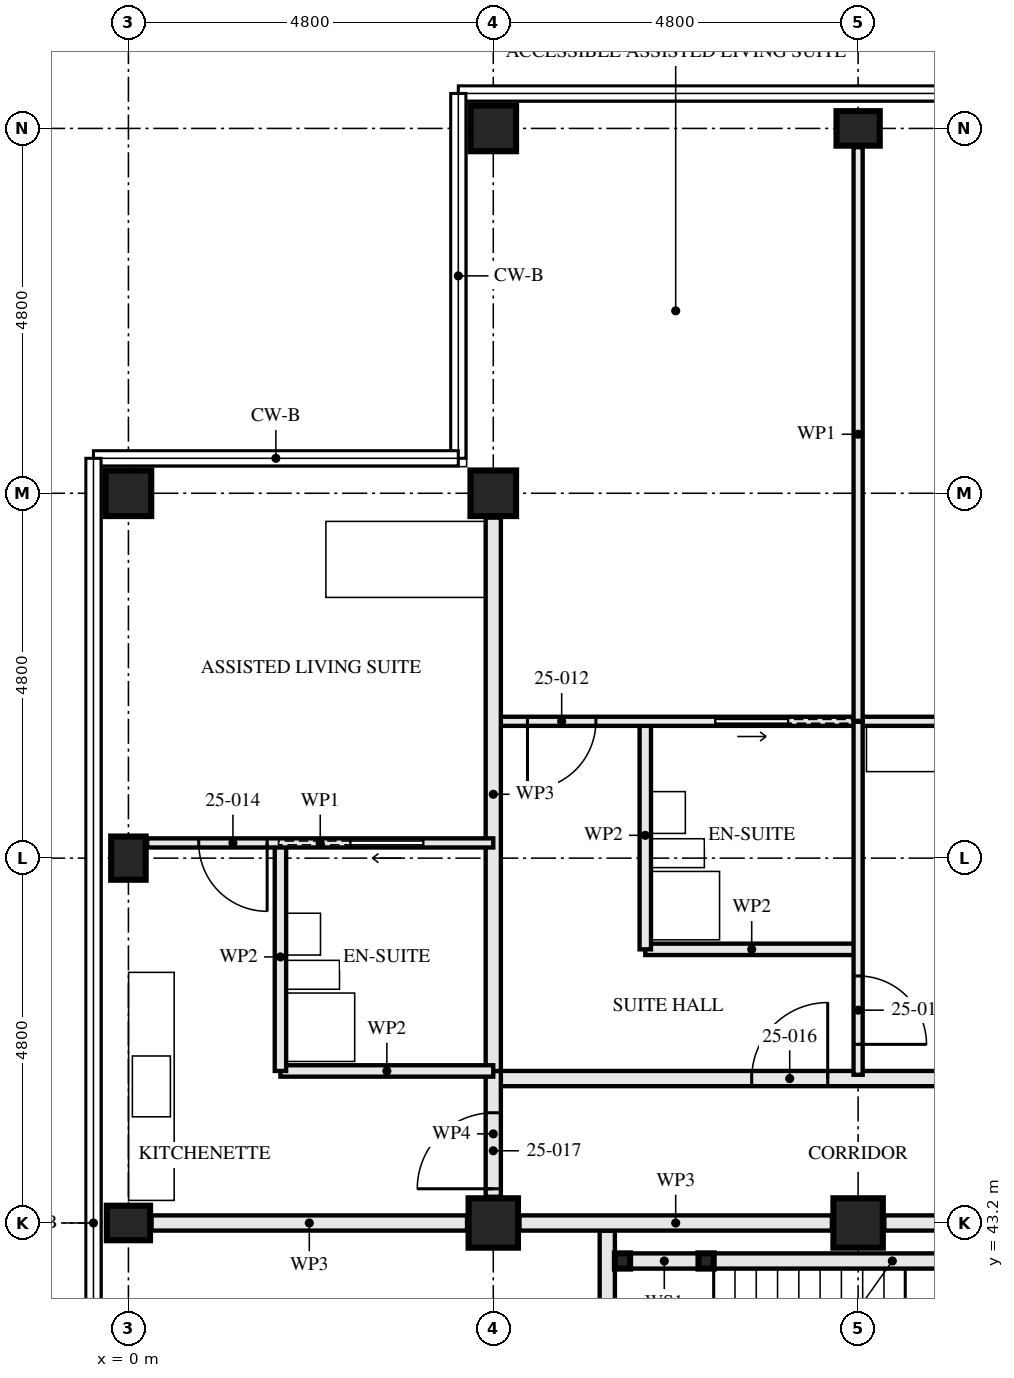
"""IFC4 building model, lengths in metres.
Left out: names, types, materials, properties, quantities, classifications, styles, units other than length and angle.
Written with IfcOpenShell. Run it as: python <this file> out.ifc"""

import sys

from ifc_helpers import new_model, si_unit, direction, frame, frame_2d, origin, origin_2d, place, context, subcontext, project, spatial, rectangle, hollow_rectangle, i_section, extrude, element, fill, save


model = new_model("IFC4")
c1 = context("Model", 3, precision=1e-05, world=origin(), true_north=direction((0.0, 1.0)))
c2 = subcontext(c1, "Body", "Model", "MODEL_VIEW")
j1 = project(units=[si_unit("LENGTHUNIT", "METRE"), si_unit("PLANEANGLEUNIT", "RADIAN")], contexts=[c1])
p1 = place(None, origin())
s1 = spatial("IfcSite", under=j1, at=p1, CompositionType="ELEMENT")
p2 = place(p1, origin())
s2 = spatial("IfcBuilding", under=s1, at=p2, CompositionType="ELEMENT")
p3 = place(p2, frame((0.0, 0.0, 94.5)))
s3 = spatial("IfcBuildingStorey", under=s2, at=p3, CompositionType="ELEMENT", Elevation=94.5)
for number, where, z_axis, x_axis in (
    (1, (0.0, 43.2, 0.0), (0.0, 0.0, 1.0), (0.0, 1.0, 0.0)),
    (2, (0.0, 48.0, 0.0), (0.0, 0.0, 1.0), (1.0, 0.0, 0.0)),
):
    element("IfcColumn", number, at=place(p3, frame(where, z_axis=z_axis, x_axis=x_axis)), inside=s3, PredefinedType="COLUMN", context=c2, shape_type="SweptSolid", body=[
        extrude(i_section(OverallWidth=0.454, OverallDepth=0.569, WebThickness=0.078, FlangeThickness=0.125, FilletRadius=0.015, at=origin_2d()), origin(), (0.0, 0.0, 1.0), 3.5),
    ])
p4 = place(p3, frame((0.0, 52.8, 0.0), z_axis=(0.0, 0.0, 1.0), x_axis=(0.0, 1.0, 0.0)))
e3 = element("IfcColumn", 3, at=p4, inside=s3, PredefinedType="COLUMN", context=c2, shape_type="SweptSolid", body=[
    extrude(hollow_rectangle(XDim=0.6, YDim=0.6, WallThickness=0.05, at=origin_2d()), origin(), (0.0, 0.0, 1.0), 3.5),
])
p5 = place(p3, frame((4.8, 43.2, 0.0), z_axis=(0.0, 0.0, 1.0), x_axis=(0.0, 1.0, 0.0)))
e4 = element("IfcColumn", 4, at=p5, inside=s3, PredefinedType="COLUMN", context=c2, shape_type="SweptSolid", body=[
    extrude(hollow_rectangle(XDim=0.65, YDim=0.65, WallThickness=0.05, at=origin_2d()), origin(), (0.0, 0.0, 1.0), 3.5),
])
for number, where, z_axis, x_axis in (
    (5, (4.8, 52.8, 0.0), (0.0, 0.0, 1.0), (0.0, 1.0, 0.0)),
    (6, (4.8, 57.6, 0.0), (0.0, 0.0, 1.0), (0.0, 1.0, 0.0)),
):
    element("IfcColumn", number, at=place(p3, frame(where, z_axis=z_axis, x_axis=x_axis)), inside=s3, PredefinedType="COLUMN", context=c2, shape_type="SweptSolid", body=[
        extrude(hollow_rectangle(XDim=0.6, YDim=0.6, WallThickness=0.05, at=origin_2d()), origin(), (0.0, 0.0, 1.0), 3.5),
    ])
p6 = place(p3, frame((9.6, 43.2, 0.0), z_axis=(0.0, 0.0, 1.0), x_axis=(0.0, 1.0, 0.0)))
e7 = element("IfcColumn", 7, at=p6, inside=s3, PredefinedType="COLUMN", context=c2, shape_type="SweptSolid", body=[
    extrude(hollow_rectangle(XDim=0.65, YDim=0.65, WallThickness=0.05, at=origin_2d()), origin(), (0.0, 0.0, 1.0), 3.5),
])
p7 = place(p3, frame((9.6, 57.6, 0.0), z_axis=(0.0, 0.0, 1.0), x_axis=(0.0, 1.0, 0.0)))
e8 = element("IfcColumn", 8, at=p7, inside=s3, PredefinedType="COLUMN", context=c2, shape_type="SweptSolid", body=[
    extrude(i_section(OverallWidth=0.454, OverallDepth=0.569, WebThickness=0.078, FlangeThickness=0.125, FilletRadius=0.015, at=origin_2d()), origin(), (0.0, 0.0, 1.0), 3.5),
])
for number, where, z_axis, x_axis in (
    (9, (6.5, 42.7, 0.0), (0.0, 0.0, 1.0), (1.0, 0.0, 0.0)),
    (10, (7.6, 42.7, 0.0), (0.0, 0.0, 1.0), (1.0, 0.0, 0.0)),
):
    element("IfcColumn", number, at=place(p3, frame(where, z_axis=z_axis, x_axis=x_axis)), inside=s3, PredefinedType="COLUMN", context=c2, shape_type="SweptSolid", body=[
        extrude(hollow_rectangle(XDim=0.2, YDim=0.2, WallThickness=0.008, at=origin_2d()), origin(), (0.0, 0.0, 1.0), 3.33),
    ])
p8 = place(p3, frame((6.6, 42.7, 0.0), z_axis=(0.0, 0.0, 1.0), x_axis=(1.0, 0.0, 0.0)))
e11 = element("IfcWall", 11, at=p8, inside=s3, PredefinedType="SOLIDWALL", context=c2, shape_type="SweptSolid", body=[
    extrude(rectangle(XDim=0.9, YDim=0.2, at=frame_2d((0.45, 0.0))), origin(), (0.0, 0.0, 1.0), 2.99),
])
p9 = place(p3, frame((7.7, 42.7, 0.0), z_axis=(0.0, 0.0, 1.0), x_axis=(1.0, 0.0, 0.0)))
e12 = element("IfcWall", 12, at=p9, inside=s3, PredefinedType="SOLIDWALL", context=c2, shape_type="SweptSolid", body=[
    extrude(rectangle(XDim=4.7, YDim=0.2, at=frame_2d((2.35, 0.0))), origin(), (0.0, 0.0, 1.0), 2.99),
])
p10 = place(p3, frame((6.3, 43.1, 0.0), z_axis=(0.0, 0.0, 1.0), x_axis=(0.0, -1.0, 0.0)))
e13 = element("IfcWall", 13, at=p10, inside=s3, PredefinedType="SOLIDWALL", context=c2, shape_type="SweptSolid", body=[
    extrude(rectangle(XDim=3.3, YDim=0.2, at=frame_2d((1.65, 0.0))), origin(), (0.0, 0.0, 1.0), 3.33),
])
p11 = place(p3, frame((6.8, 49.8, 0.0), z_axis=(0.0, 0.0, 1.0), x_axis=(0.0, -1.0, 0.0)))
e14 = element("IfcWall", 14, at=p11, inside=s3, PredefinedType="PARTITIONING", context=c2, shape_type="SweptSolid", body=[
    extrude(rectangle(XDim=3.0, YDim=0.15, at=frame_2d((1.5, 0.0))), origin(), (0.0, 0.0, 1.0), 2.55),
])
p12 = place(p3, frame((9.6, 46.8, 0.0), z_axis=(0.0, 0.0, 1.0), x_axis=(-1.0, 0.0, 0.0)))
e15 = element("IfcWall", 15, at=p12, inside=s3, PredefinedType="PARTITIONING", context=c2, shape_type="SweptSolid", body=[
    extrude(rectangle(XDim=2.8, YDim=0.15, at=frame_2d((1.4, 0.0))), origin(), (0.0, 0.0, 1.0), 3.33),
])
p13 = place(p3, frame((9.6, 49.8, 0.0), z_axis=(0.0, 0.0, 1.0), x_axis=(0.0, -1.0, 0.0)))
e16 = element("IfcWall", 16, at=p13, inside=s3, PredefinedType="PARTITIONING", context=c2, shape_type="SweptSolid", body=[
    extrude(rectangle(XDim=4.65, YDim=0.12, at=frame_2d((2.325, 0.0))), origin(), (0.0, 0.0, 1.0), 2.55),
])
p14 = place(p13, frame((3.35, 0.0, 0.0)))
e17 = element("IfcOpeningElement", 17, at=p14, cuts=e16, PredefinedType="OPENING", context=c2, shape_type="SweptSolid", body=[
    extrude(rectangle(XDim=0.9, YDim=2.1, at=frame_2d((0.45, 1.05))), frame((0.0, 0.071, 0.0), z_axis=(0.0, -1.0, 0.0), x_axis=(1.0, 0.0, 0.0)), (0.0, 0.0, 1.0), 0.141),
])
p15 = place(p3, frame((14.4, 49.8, 0.0), z_axis=(0.0, 0.0, 1.0), x_axis=(-1.0, 0.0, 0.0)))
e18 = element("IfcWall", 18, at=p15, inside=s3, PredefinedType="PARTITIONING", context=c2, shape_type="SweptSolid", body=[
    extrude(rectangle(XDim=4.8, YDim=0.12, at=frame_2d((2.4, 0.0))), origin(), (0.0, 0.0, 1.0), 3.33),
])
p16 = place(p15, frame((0.45, 0.0, 0.0)))
e19 = element("IfcOpeningElement", 19, at=p16, cuts=e18, PredefinedType="OPENING", context=c2, shape_type="SweptSolid", body=[
    extrude(rectangle(XDim=0.9, YDim=2.1, at=frame_2d((0.45, 1.05))), frame((0.0, 0.071, 0.0), z_axis=(0.0, -1.0, 0.0), x_axis=(1.0, 0.0, 0.0)), (0.0, 0.0, 1.0), 0.141),
])
p17 = place(p3, frame((9.6, 49.8, 0.0), z_axis=(0.0, 0.0, 1.0), x_axis=(-1.0, 0.0, 0.0)))
e20 = element("IfcWall", 20, at=p17, inside=s3, PredefinedType="PARTITIONING", context=c2, shape_type="SweptSolid", body=[
    extrude(rectangle(XDim=4.8, YDim=0.12, at=frame_2d((2.4, 0.0))), origin(), (0.0, 0.0, 1.0), 3.33),
])
p18 = place(p17, frame((3.45, 0.0, 0.0)))
e21 = element("IfcOpeningElement", 21, at=p18, cuts=e20, PredefinedType="OPENING", context=c2, shape_type="SweptSolid", body=[
    extrude(rectangle(XDim=0.9, YDim=2.1, at=frame_2d((0.45, 1.05))), frame((0.0, 0.071, 0.0), z_axis=(0.0, -1.0, 0.0), x_axis=(1.0, 0.0, 0.0)), (0.0, 0.0, 1.0), 0.141),
])
p19 = place(p17, frame((0.925, 0.0, 0.0)))
e22 = element("IfcOpeningElement", 22, at=p19, cuts=e20, PredefinedType="OPENING", context=c2, shape_type="SweptSolid", body=[
    extrude(rectangle(XDim=0.95, YDim=2.1, at=frame_2d((0.475, 1.05))), frame((0.0, 0.071, 0.0), z_axis=(0.0, -1.0, 0.0), x_axis=(1.0, 0.0, 0.0)), (0.0, 0.0, 1.0), 0.141),
])
p20 = place(p3, frame((9.6, 57.353, 0.0), z_axis=(0.0, 0.0, 1.0), x_axis=(0.0, -1.0, 0.0)))
e23 = element("IfcWall", 23, at=p20, inside=s3, PredefinedType="PARTITIONING", context=c2, shape_type="SweptSolid", body=[
    extrude(rectangle(XDim=7.553, YDim=0.12, at=frame_2d((3.776, 0.0))), origin(), (0.0, 0.0, 1.0), 2.55),
])
p21 = place(p3, frame((4.8, 52.48, 0.0), z_axis=(0.0, 0.0, 1.0), x_axis=(0.0, -1.0, 0.0)))
e24 = element("IfcWall", 24, at=p21, inside=s3, PredefinedType="PARTITIONING", context=c2, shape_type="SweptSolid", body=[
    extrude(rectangle(XDim=7.28, YDim=0.2, at=frame_2d((3.64, 0.0))), origin(), (0.0, 0.0, 1.0), 2.55),
])
p22 = place(p3, frame((2.0, 48.2, 0.0), z_axis=(0.0, 0.0, 1.0), x_axis=(0.0, -1.0, 0.0)))
e25 = element("IfcWall", 25, at=p22, inside=s3, PredefinedType="PARTITIONING", context=c2, shape_type="SweptSolid", body=[
    extrude(rectangle(XDim=3.0, YDim=0.15, at=frame_2d((1.5, 0.0))), origin(), (0.0, 0.0, 1.0), 2.55),
])
p23 = place(p3, frame((4.8, 45.2, 0.0), z_axis=(0.0, 0.0, 1.0), x_axis=(-1.0, 0.0, 0.0)))
e26 = element("IfcWall", 26, at=p23, inside=s3, PredefinedType="PARTITIONING", context=c2, shape_type="SweptSolid", body=[
    extrude(rectangle(XDim=2.8, YDim=0.15, at=frame_2d((1.4, 0.0))), origin(), (0.0, 0.0, 1.0), 3.33),
])
p24 = place(p3, frame((4.8, 48.2, 0.0), z_axis=(0.0, 0.0, 1.0), x_axis=(-1.0, 0.0, 0.0)))
e27 = element("IfcWall", 27, at=p24, inside=s3, PredefinedType="PARTITIONING", context=c2, shape_type="SweptSolid", body=[
    extrude(rectangle(XDim=4.553, YDim=0.12, at=frame_2d((2.276, 0.0))), origin(), (0.0, 0.0, 1.0), 3.33),
])
p25 = place(p24, frame((2.975, 0.0, 0.0)))
e28 = element("IfcOpeningElement", 28, at=p25, cuts=e27, PredefinedType="OPENING", context=c2, shape_type="SweptSolid", body=[
    extrude(rectangle(XDim=0.9, YDim=2.1, at=frame_2d((0.45, 1.05))), frame((0.0, 0.071, 0.0), z_axis=(0.0, -1.0, 0.0), x_axis=(1.0, 0.0, 0.0)), (0.0, 0.0, 1.0), 0.141),
])
p26 = place(p24, frame((0.925, 0.0, 0.0)))
e29 = element("IfcOpeningElement", 29, at=p26, cuts=e27, PredefinedType="OPENING", context=c2, shape_type="SweptSolid", body=[
    extrude(rectangle(XDim=0.95, YDim=2.1, at=frame_2d((0.475, 1.05))), frame((0.0, 0.071, 0.0), z_axis=(0.0, -1.0, 0.0), x_axis=(1.0, 0.0, 0.0)), (0.0, 0.0, 1.0), 0.141),
])
p27 = place(p3, frame((14.4, 45.1, 0.0), z_axis=(0.0, 0.0, 1.0), x_axis=(-1.0, 0.0, 0.0)))
e30 = element("IfcWall", 30, at=p27, inside=s3, PredefinedType="PARTITIONING", context=c2, shape_type="SweptSolid", body=[
    extrude(rectangle(XDim=9.6, YDim=0.2, at=frame_2d((4.8, 0.0))), origin(), (0.0, 0.0, 1.0), 3.33),
])
p28 = place(p27, frame((5.2, 0.0, 0.0)))
e31 = element("IfcOpeningElement", 31, at=p28, cuts=e30, PredefinedType="OPENING", context=c2, shape_type="SweptSolid", body=[
    extrude(rectangle(XDim=1.0, YDim=2.1, at=frame_2d((0.5, 1.05))), frame((0.0, 0.111, 0.0), z_axis=(0.0, -1.0, 0.0), x_axis=(1.0, 0.0, 0.0)), (0.0, 0.0, 1.0), 0.221),
])
p29 = place(p3, frame((4.8, 45.2, 0.0), z_axis=(0.0, 0.0, 1.0), x_axis=(0.0, -1.0, 0.0)))
e32 = element("IfcWall", 32, at=p29, inside=s3, PredefinedType="PARTITIONING", context=c2, shape_type="SweptSolid", body=[
    extrude(rectangle(XDim=1.655, YDim=0.2, at=frame_2d((0.828, 0.0))), origin(), (0.0, 0.0, 1.0), 3.33),
])
p30 = place(p29, frame((0.55, 0.0, 0.0)))
e33 = element("IfcOpeningElement", 33, at=p30, cuts=e32, PredefinedType="OPENING", context=c2, shape_type="SweptSolid", body=[
    extrude(rectangle(XDim=1.0, YDim=2.1, at=frame_2d((0.5, 1.05))), frame((0.0, 0.111, 0.0), z_axis=(0.0, -1.0, 0.0), x_axis=(1.0, 0.0, 0.0)), (0.0, 0.0, 1.0), 0.221),
])
p31 = place(p3, frame((12.5, 43.2, 0.0), z_axis=(0.0, 0.0, 1.0), x_axis=(-1.0, 0.0, 0.0)))
e34 = element("IfcWall", 34, at=p31, inside=s3, PredefinedType="PARTITIONING", context=c2, shape_type="SweptSolid", body=[
    extrude(rectangle(XDim=2.555, YDim=0.2, at=frame_2d((1.277, 0.0))), origin(), (0.0, 0.0, 1.0), 2.32),
])
p32 = place(p3, frame((9.255, 43.2, 0.0), z_axis=(0.0, 0.0, 1.0), x_axis=(-1.0, 0.0, 0.0)))
e35 = element("IfcWall", 35, at=p32, inside=s3, PredefinedType="PARTITIONING", context=c2, shape_type="SweptSolid", body=[
    extrude(rectangle(XDim=4.11, YDim=0.2, at=frame_2d((2.055, 0.0))), origin(), (0.0, 0.0, 1.0), 2.32),
])
p33 = place(p3, frame((4.455, 43.2, 0.0), z_axis=(0.0, 0.0, 1.0), x_axis=(-1.0, 0.0, 0.0)))
e36 = element("IfcWall", 36, at=p33, inside=s3, PredefinedType="PARTITIONING", context=c2, shape_type="SweptSolid", body=[
    extrude(rectangle(XDim=4.151, YDim=0.2, at=frame_2d((2.075, 0.0))), origin(), (0.0, 0.0, 1.0), 2.32),
])
p34 = place(p14, origin())
e37 = element("IfcDoor", 37, at=p34, inside=s3, OperationType="SINGLE_SWING_LEFT", PredefinedType="DOOR", context=c2, shape_type="SweptSolid", body=[
    extrude(rectangle(XDim=0.9, YDim=2.1, at=frame_2d((0.45, 1.05))), frame((0.0, 0.022, 0.0), z_axis=(0.0, -1.0, 0.0), x_axis=(1.0, 0.0, 0.0)), (0.0, 0.0, 1.0), 0.044),
])
fill(e17, e37)
p35 = place(p18, origin())
e38 = element("IfcDoor", 38, at=p35, inside=s3, OperationType="SINGLE_SWING_LEFT", PredefinedType="DOOR", context=c2, shape_type="SweptSolid", body=[
    extrude(rectangle(XDim=0.9, YDim=2.1, at=frame_2d((0.45, 1.05))), frame((0.0, 0.022, 0.0), z_axis=(0.0, -1.0, 0.0), x_axis=(1.0, 0.0, 0.0)), (0.0, 0.0, 1.0), 0.044),
])
fill(e21, e38)
p36 = place(p19, origin())
e39 = element("IfcDoor", 39, at=p36, inside=s3, OperationType="SLIDING_TO_RIGHT", PredefinedType="DOOR", context=c2, shape_type="SweptSolid", body=[
    extrude(rectangle(XDim=0.95, YDim=2.1, at=frame_2d((0.475, 1.05))), frame((0.0, 0.022, 0.0), z_axis=(0.0, -1.0, 0.0), x_axis=(1.0, 0.0, 0.0)), (0.0, 0.0, 1.0), 0.044),
])
fill(e22, e39)
p37 = place(p25, origin())
e40 = element("IfcDoor", 40, at=p37, inside=s3, OperationType="SINGLE_SWING_RIGHT", PredefinedType="DOOR", context=c2, shape_type="SweptSolid", body=[
    extrude(rectangle(XDim=0.9, YDim=2.1, at=frame_2d((0.45, 1.05))), frame((0.0, 0.022, 0.0), z_axis=(0.0, -1.0, 0.0), x_axis=(1.0, 0.0, 0.0)), (0.0, 0.0, 1.0), 0.044),
])
fill(e28, e40)
p38 = place(p26, origin())
e41 = element("IfcDoor", 41, at=p38, inside=s3, OperationType="SLIDING_TO_LEFT", PredefinedType="DOOR", context=c2, shape_type="SweptSolid", body=[
    extrude(rectangle(XDim=0.95, YDim=2.1, at=frame_2d((0.475, 1.05))), frame((0.0, 0.022, 0.0), z_axis=(0.0, -1.0, 0.0), x_axis=(1.0, 0.0, 0.0)), (0.0, 0.0, 1.0), 0.044),
])
fill(e29, e41)
p39 = place(p28, frame((1.0, 0.0, 0.0), z_axis=(0.0, 0.0, 1.0), x_axis=(-1.0, 0.0, 0.0)))
e42 = element("IfcDoor", 42, at=p39, inside=s3, OperationType="SINGLE_SWING_LEFT", PredefinedType="DOOR", context=c2, shape_type="SweptSolid", body=[
    extrude(rectangle(XDim=1.0, YDim=2.1, at=frame_2d((0.5, 1.05))), frame((0.0, 0.027, 0.0), z_axis=(0.0, -1.0, 0.0), x_axis=(1.0, 0.0, 0.0)), (0.0, 0.0, 1.0), 0.054),
])
fill(e31, e42)
p40 = place(p30, frame((1.0, 0.0, 0.0), z_axis=(0.0, 0.0, 1.0), x_axis=(-1.0, 0.0, 0.0)))
e43 = element("IfcDoor", 43, at=p40, inside=s3, OperationType="SINGLE_SWING_RIGHT", PredefinedType="DOOR", context=c2, shape_type="SweptSolid", body=[
    extrude(rectangle(XDim=1.0, YDim=2.1, at=frame_2d((0.5, 1.05))), frame((0.0, 0.027, 0.0), z_axis=(0.0, -1.0, 0.0), x_axis=(1.0, 0.0, 0.0)), (0.0, 0.0, 1.0), 0.054),
])
fill(e33, e43)
save(model, sys.argv[1])
